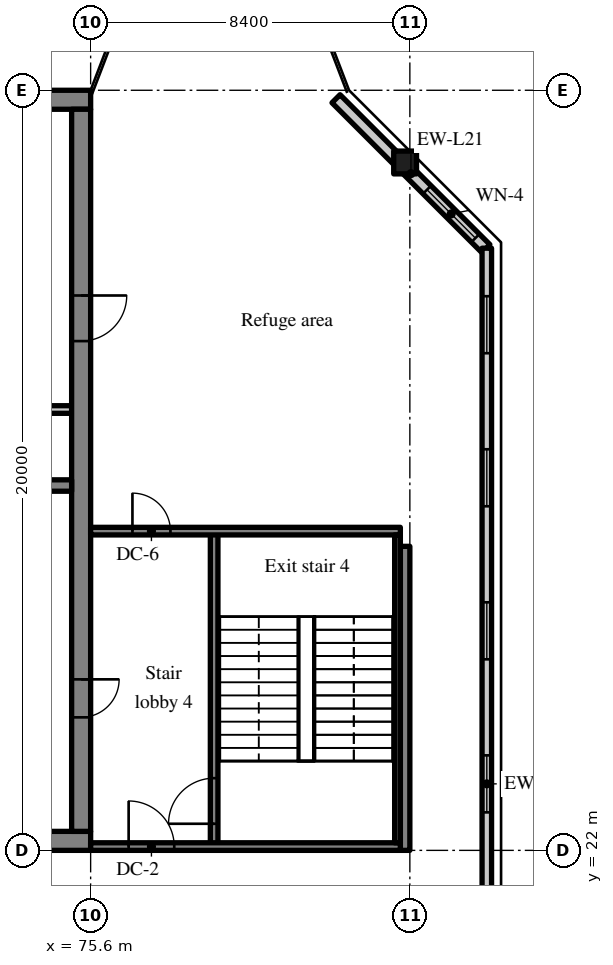
"""IFC4 building model, lengths in metres.
Left out: names, types, materials, properties, quantities, classifications, styles, units other than length and angle.
Written with IfcOpenShell. Run it as: python <this file> out.ifc"""

import sys

from ifc_helpers import new_model, si_unit, direction, frame, frame_2d, origin, origin_2d, place, context, subcontext, project, spatial, rectangle, extrude, source, transform, mapped, element, fill, save


model = new_model("IFC4")
c1 = context("Model", 3, precision=1e-05, world=origin(), true_north=direction((0.0, 1.0)))
c2 = subcontext(c1, "Body", "Model", "MODEL_VIEW")
j1 = project(units=[si_unit("LENGTHUNIT", "METRE"), si_unit("PLANEANGLEUNIT", "RADIAN")], contexts=[c1])
p1 = place(None, origin())
s1 = spatial("IfcSite", under=j1, at=p1, CompositionType="ELEMENT")
p2 = place(p1, origin())
s2 = spatial("IfcBuilding", under=s1, at=p2, CompositionType="ELEMENT")
p3 = place(p2, frame((0.0, 0.0, 305.7)))
s3 = spatial("IfcBuildingStorey", under=s2, at=p3, CompositionType="ELEMENT", Elevation=305.7)
m1 = source(origin(), c2, "Body", "SweptSolid", [
    extrude(rectangle(XDim=50.4, YDim=0.5, at=frame_2d((25.2, 0.0))), origin(), (0.0, 0.0, 1.0), 3.72),
])
p4 = place(p3, frame((25.2, 22.25, 0.0), z_axis=(0.0, 0.0, 1.0), x_axis=(1.0, 0.0, 0.0)))
e1 = element("IfcWall", 1, at=p4, inside=s3, PredefinedType="SHEAR", context=c2, shape_type="MappedRepresentation", body=[
    mapped(m1, transform((0.0, 0.0, 0.0), scale=1.0)),
])
m2 = source(origin(), c2, "Body", "SweptSolid", [
    extrude(rectangle(XDim=1.8, YDim=2.1, at=frame_2d((0.9, 1.05))), frame((0.0, 0.26, 0.0), z_axis=(0.0, -1.0, 0.0), x_axis=(1.0, 0.0, 0.0)), (0.0, 0.0, 1.0), 0.52),
])
p5 = place(p4, frame((15.9, 0.0, 0.0)))
e2 = element("IfcOpeningElement", 2, at=p5, cuts=e1, PredefinedType="OPENING", context=c2, shape_type="MappedRepresentation", body=[
    mapped(m2, transform((0.0, 0.0, 0.0), scale=1.0)),
])
m3 = source(origin(), c2, "Body", "SweptSolid", [
    extrude(rectangle(XDim=0.9, YDim=2.1, at=frame_2d((0.45, 1.05))), frame((0.0, 0.26, 0.0), z_axis=(0.0, -1.0, 0.0), x_axis=(1.0, 0.0, 0.0)), (0.0, 0.0, 1.0), 0.52),
])
p6 = place(p4, frame((11.175, 0.0, 0.0)))
e3 = element("IfcOpeningElement", 3, at=p6, cuts=e1, PredefinedType="OPENING", context=c2, shape_type="MappedRepresentation", body=[
    mapped(m3, transform((0.0, 0.0, 0.0), scale=1.0)),
])
p7 = place(p4, frame((21.525, 0.0, 0.0)))
e4 = element("IfcOpeningElement", 4, at=p7, cuts=e1, PredefinedType="OPENING", context=c2, shape_type="MappedRepresentation", body=[
    mapped(m3, transform((0.0, 0.0, 0.0), scale=1.0)),
])
p8 = place(p4, frame((32.7, 0.0, 0.0)))
e5 = element("IfcOpeningElement", 5, at=p8, cuts=e1, PredefinedType="OPENING", context=c2, shape_type="MappedRepresentation", body=[
    mapped(m2, transform((0.0, 0.0, 0.0), scale=1.0)),
])
m4 = source(origin(), c2, "Body", "SweptSolid", [
    extrude(rectangle(XDim=1.2, YDim=2.1, at=frame_2d((0.6, 1.05))), frame((0.0, 0.26, 0.0), z_axis=(0.0, -1.0, 0.0), x_axis=(1.0, 0.0, 0.0)), (0.0, 0.0, 1.0), 0.52),
])
p9 = place(p4, frame((6.5, 0.0, 0.0)))
e6 = element("IfcOpeningElement", 6, at=p9, cuts=e1, PredefinedType="OPENING", context=c2, shape_type="MappedRepresentation", body=[
    mapped(m4, transform((0.0, 0.0, 0.0), scale=1.0)),
])
p10 = place(p4, frame((47.975, 0.0, 0.0)))
e7 = element("IfcOpeningElement", 7, at=p10, cuts=e1, PredefinedType="OPENING", context=c2, shape_type="MappedRepresentation", body=[
    mapped(m4, transform((0.0, 0.0, 0.0), scale=1.0)),
])
p11 = place(p3, frame((25.2, 41.75, 0.0), z_axis=(0.0, 0.0, 1.0), x_axis=(1.0, 0.0, 0.0)))
e8 = element("IfcWall", 8, at=p11, inside=s3, PredefinedType="SHEAR", context=c2, shape_type="MappedRepresentation", body=[
    mapped(m1, transform((0.0, 0.0, 0.0), scale=1.0)),
])
m5 = source(origin(), c2, "Body", "SweptSolid", [
    extrude(rectangle(XDim=19.0, YDim=0.5, at=frame_2d((9.5, 0.0))), origin(), (0.0, 0.0, 1.0), 3.72),
])
p12 = place(p3, frame((75.35, 22.5, 0.0), z_axis=(0.0, 0.0, 1.0), x_axis=(0.0, 1.0, 0.0)))
e9 = element("IfcWall", 9, at=p12, inside=s3, PredefinedType="SHEAR", context=c2, shape_type="MappedRepresentation", body=[
    mapped(m5, transform((0.0, 0.0, 0.0), scale=1.0)),
])
m6 = source(origin(), c2, "Body", "SweptSolid", [
    extrude(rectangle(XDim=1.0, YDim=2.1, at=frame_2d((0.5, 1.05))), frame((0.0, 0.26, 0.0), z_axis=(0.0, -1.0, 0.0), x_axis=(1.0, 0.0, 0.0)), (0.0, 0.0, 1.0), 0.52),
])
p13 = place(p12, frame((3.0, 0.0, 0.0)))
e10 = element("IfcOpeningElement", 10, at=p13, cuts=e9, PredefinedType="OPENING", context=c2, shape_type="MappedRepresentation", body=[
    mapped(m6, transform((0.0, 0.0, 0.0), scale=1.0)),
])
p14 = place(p12, frame((12.9, 0.0, 0.0)))
e11 = element("IfcOpeningElement", 11, at=p14, cuts=e9, PredefinedType="OPENING", context=c2, shape_type="MappedRepresentation", body=[
    mapped(m4, transform((0.0, 0.0, 0.0), scale=1.0)),
])
m7 = source(origin(), c2, "Body", "SweptSolid", [
    extrude(rectangle(XDim=7.75, YDim=0.3, at=frame_2d((3.875, 0.0))), origin(), (0.0, 0.0, 1.0), 3.72),
])
p15 = place(p3, frame((67.35, 31.6, 0.0), z_axis=(0.0, 0.0, 1.0), x_axis=(1.0, 0.0, 0.0)))
e12 = element("IfcWall", 12, at=p15, inside=s3, PredefinedType="SHEAR", context=c2, shape_type="MappedRepresentation", body=[
    mapped(m7, transform((0.0, 0.0, 0.0), scale=1.0)),
])
m8 = source(origin(), c2, "Body", "SweptSolid", [
    extrude(rectangle(XDim=1.1, YDim=2.1, at=frame_2d((0.55, 1.05))), frame((0.0, 0.16, 0.0), z_axis=(0.0, -1.0, 0.0), x_axis=(1.0, 0.0, 0.0)), (0.0, 0.0, 1.0), 0.32),
])
p16 = place(p15, frame((5.875, 0.0, 0.0)))
e13 = element("IfcOpeningElement", 13, at=p16, cuts=e12, PredefinedType="OPENING", context=c2, shape_type="MappedRepresentation", body=[
    mapped(m8, transform((0.0, 0.0, 0.0), scale=1.0)),
])
m9 = source(origin(), c2, "Body", "SweptSolid", [
    extrude(rectangle(XDim=8.0, YDim=0.25, at=frame_2d((4.0, 0.0))), origin(), (0.0, 0.0, 1.0), 3.72),
])
p17 = place(p3, frame((83.875, 22.0, 0.0), z_axis=(0.0, 0.0, 1.0), x_axis=(0.0, 1.0, 0.0)))
e14 = element("IfcWall", 14, at=p17, inside=s3, PredefinedType="SHEAR", context=c2, shape_type="MappedRepresentation", body=[
    mapped(m9, transform((0.0, 0.0, 0.0), scale=1.0)),
])
m10 = source(origin(), c2, "Body", "SweptSolid", [
    extrude(rectangle(XDim=0.6, YDim=0.6, at=origin_2d()), origin(), (0.0, 0.0, 1.0), 3.72),
])
p18 = place(p3, frame((83.875, 40.1, 0.0), z_axis=(0.0, 0.0, 1.0), x_axis=(1.0, 0.0, 0.0)))
e15 = element("IfcColumn", 15, at=p18, inside=s3, PredefinedType="COLUMN", context=c2, shape_type="MappedRepresentation", body=[
    mapped(m10, transform((0.0, 0.0, 0.0), scale=1.0)),
])
m11 = source(origin(), c2, "Body", "SweptSolid", [
    extrude(rectangle(XDim=5.576, YDim=0.3, at=frame_2d((2.788, 0.0))), origin(), (0.0, 0.0, 1.0), 3.72),
])
p19 = place(p3, frame((86.0, 37.834, 0.0), z_axis=(0.0, 0.0, 1.0), x_axis=(-0.707106781187, 0.707106781187, 0.0)))
e16 = element("IfcWall", 16, at=p19, inside=s3, PredefinedType="SOLIDWALL", context=c2, shape_type="MappedRepresentation", body=[
    mapped(m11, transform((0.0, 0.0, 0.0), scale=1.0)),
])
m12 = source(origin(), c2, "Body", "SweptSolid", [
    extrude(rectangle(XDim=1.8, YDim=1.5, at=frame_2d((0.9, 0.75))), frame((0.0, 0.16, 0.0), z_axis=(0.0, -1.0, 0.0), x_axis=(1.0, 0.0, 0.0)), (0.0, 0.0, 1.0), 0.32),
])
p20 = place(p19, frame((0.39, 0.0, 0.9)))
e17 = element("IfcOpeningElement", 17, at=p20, cuts=e16, PredefinedType="OPENING", context=c2, shape_type="MappedRepresentation", body=[
    mapped(m12, transform((0.0, 0.0, 0.0), scale=1.0)),
])
m13 = source(origin(), c2, "Body", "SweptSolid", [
    extrude(rectangle(XDim=28.189, YDim=0.25, at=frame_2d((14.095, 0.0))), origin(), (0.0, 0.0, 1.0), 3.72),
])
p21 = place(p3, frame((86.025, 9.655, 0.0), z_axis=(0.0, 0.0, 1.0), x_axis=(0.0, 1.0, 0.0)))
e18 = element("IfcWall", 18, at=p21, inside=s3, PredefinedType="SOLIDWALL", context=c2, shape_type="MappedRepresentation", body=[
    mapped(m13, transform((0.0, 0.0, 0.0), scale=1.0)),
])
m14 = source(origin(), c2, "Body", "SweptSolid", [
    extrude(rectangle(XDim=1.5, YDim=1.5, at=frame_2d((0.75, 0.75))), frame((0.0, 0.135, 0.0), z_axis=(0.0, -1.0, 0.0), x_axis=(1.0, 0.0, 0.0)), (0.0, 0.0, 1.0), 0.27),
])
p22 = place(p21, frame((1.263, 0.0, 0.9)))
e19 = element("IfcOpeningElement", 19, at=p22, cuts=e18, PredefinedType="OPENING", context=c2, shape_type="MappedRepresentation", body=[
    mapped(m14, transform((0.0, 0.0, 0.0), scale=1.0)),
])
p23 = place(p21, frame((5.291, 0.0, 0.9)))
e20 = element("IfcOpeningElement", 20, at=p23, cuts=e18, PredefinedType="OPENING", context=c2, shape_type="MappedRepresentation", body=[
    mapped(m14, transform((0.0, 0.0, 0.0), scale=1.0)),
])
p24 = place(p21, frame((9.318, 0.0, 0.9)))
e21 = element("IfcOpeningElement", 21, at=p24, cuts=e18, PredefinedType="OPENING", context=c2, shape_type="MappedRepresentation", body=[
    mapped(m14, transform((0.0, 0.0, 0.0), scale=1.0)),
])
p25 = place(p21, frame((13.345, 0.0, 0.9)))
e22 = element("IfcOpeningElement", 22, at=p25, cuts=e18, PredefinedType="OPENING", context=c2, shape_type="MappedRepresentation", body=[
    mapped(m14, transform((0.0, 0.0, 0.0), scale=1.0)),
])
p26 = place(p21, frame((17.372, 0.0, 0.9)))
e23 = element("IfcOpeningElement", 23, at=p26, cuts=e18, PredefinedType="OPENING", context=c2, shape_type="MappedRepresentation", body=[
    mapped(m14, transform((0.0, 0.0, 0.0), scale=1.0)),
])
p27 = place(p21, frame((21.399, 0.0, 0.9)))
e24 = element("IfcOpeningElement", 24, at=p27, cuts=e18, PredefinedType="OPENING", context=c2, shape_type="MappedRepresentation", body=[
    mapped(m14, transform((0.0, 0.0, 0.0), scale=1.0)),
])
p28 = place(p21, frame((25.426, 0.0, 0.9)))
e25 = element("IfcOpeningElement", 25, at=p28, cuts=e18, PredefinedType="OPENING", context=c2, shape_type="MappedRepresentation", body=[
    mapped(m14, transform((0.0, 0.0, 0.0), scale=1.0)),
])
m15 = source(origin(), c2, "Body", "SweptSolid", [
    extrude(rectangle(XDim=2.65, YDim=0.2, at=frame_2d((1.325, 0.0))), origin(), (0.0, 0.0, 1.0), 3.72),
])
p29 = place(p3, frame((72.45, 33.6, 0.0), z_axis=(0.0, 0.0, 1.0), x_axis=(1.0, 0.0, 0.0)))
e26 = element("IfcWall", 26, at=p29, inside=s3, PredefinedType="SOLIDWALL", context=c2, shape_type="MappedRepresentation", body=[
    mapped(m15, transform((0.0, 0.0, 0.0), scale=1.0)),
])
m16 = source(origin(), c2, "Body", "SweptSolid", [
    extrude(rectangle(XDim=8.3, YDim=0.2, at=frame_2d((4.15, 0.0))), origin(), (0.0, 0.0, 1.0), 3.72),
])
p30 = place(p3, frame((78.85, 22.1, 0.0), z_axis=(0.0, 0.0, 1.0), x_axis=(0.0, 1.0, 0.0)))
e27 = element("IfcWall", 27, at=p30, inside=s3, PredefinedType="SOLIDWALL", context=c2, shape_type="MappedRepresentation", body=[
    mapped(m16, transform((0.0, 0.0, 0.0), scale=1.0)),
])
m17 = source(origin(), c2, "Body", "SweptSolid", [
    extrude(rectangle(XDim=1.2, YDim=2.1, at=frame_2d((0.6, 1.05))), frame((0.0, 0.11, 0.0), z_axis=(0.0, -1.0, 0.0), x_axis=(1.0, 0.0, 0.0)), (0.0, 0.0, 1.0), 0.22),
])
p31 = place(p30, frame((0.6, 0.0, 0.0)))
e28 = element("IfcOpeningElement", 28, at=p31, cuts=e27, PredefinedType="OPENING", context=c2, shape_type="MappedRepresentation", body=[
    mapped(m17, transform((0.0, 0.0, 0.0), scale=1.0)),
])
m18 = source(origin(), c2, "Body", "SweptSolid", [
    extrude(rectangle(XDim=8.15, YDim=0.2, at=frame_2d((4.075, 0.0))), origin(), (0.0, 0.0, 1.0), 3.72),
])
p32 = place(p3, frame((83.75, 22.1, 0.0), z_axis=(0.0, 0.0, 1.0), x_axis=(-1.0, 0.0, 0.0)))
e29 = element("IfcWall", 29, at=p32, inside=s3, PredefinedType="SOLIDWALL", context=c2, shape_type="MappedRepresentation", body=[
    mapped(m18, transform((0.0, 0.0, 0.0), scale=1.0)),
])
p33 = place(p32, frame((5.95, 0.0, 0.0)))
e30 = element("IfcOpeningElement", 30, at=p33, cuts=e29, PredefinedType="OPENING", context=c2, shape_type="MappedRepresentation", body=[
    mapped(m17, transform((0.0, 0.0, 0.0), scale=1.0)),
])
p34 = place(p3, frame((83.75, 30.4, 0.0), z_axis=(0.0, 0.0, 1.0), x_axis=(-1.0, 0.0, 0.0)))
e31 = element("IfcWall", 31, at=p34, inside=s3, PredefinedType="SOLIDWALL", context=c2, shape_type="MappedRepresentation", body=[
    mapped(m18, transform((0.0, 0.0, 0.0), scale=1.0)),
])
m19 = source(origin(), c2, "Body", "SweptSolid", [
    extrude(rectangle(XDim=1.0, YDim=2.1, at=frame_2d((0.5, 1.05))), frame((0.0, 0.11, 0.0), z_axis=(0.0, -1.0, 0.0), x_axis=(1.0, 0.0, 0.0)), (0.0, 0.0, 1.0), 0.22),
])
p35 = place(p34, frame((6.05, 0.0, 0.0)))
e32 = element("IfcOpeningElement", 32, at=p35, cuts=e31, PredefinedType="OPENING", context=c2, shape_type="MappedRepresentation", body=[
    mapped(m19, transform((0.0, 0.0, 0.0), scale=1.0)),
])
m20 = source(origin(), c2, "Body", "SweptSolid", [
    extrude(rectangle(XDim=8.1, YDim=0.15, at=frame_2d((4.05, 0.0))), origin(), (0.0, 0.0, 1.0), 3.72),
])
p36 = place(p3, frame((83.675, 22.2, 0.0), z_axis=(0.0, 0.0, 1.0), x_axis=(0.0, 1.0, 0.0)))
e33 = element("IfcWall", 33, at=p36, inside=s3, PredefinedType="SOLIDWALL", context=c2, shape_type="MappedRepresentation", body=[
    mapped(m20, transform((0.0, 0.0, 0.0), scale=1.0)),
])
m21 = source(origin(), c2, "Body", "SweptSolid", [
    extrude(rectangle(XDim=1.8, YDim=1.5, at=frame_2d((0.9, 0.75))), frame((0.0, 0.03, 0.0), z_axis=(0.0, -1.0, 0.0), x_axis=(1.0, 0.0, 0.0)), (0.0, 0.0, 1.0), 0.06),
])
p37 = place(p20, origin())
e34 = element("IfcWindow", 34, at=p37, inside=s3, PartitioningType="SINGLE_PANEL", PredefinedType="WINDOW", context=c2, shape_type="MappedRepresentation", body=[
    mapped(m21, transform((0.0, 0.0, 0.0), scale=1.0)),
])
fill(e17, e34)
m22 = source(origin(), c2, "Body", "SweptSolid", [
    extrude(rectangle(XDim=1.5, YDim=1.5, at=frame_2d((0.75, 0.75))), frame((0.0, 0.03, 0.0), z_axis=(0.0, -1.0, 0.0), x_axis=(1.0, 0.0, 0.0)), (0.0, 0.0, 1.0), 0.06),
])
p38 = place(p25, origin())
e35 = element("IfcWindow", 35, at=p38, inside=s3, PartitioningType="SINGLE_PANEL", PredefinedType="WINDOW", context=c2, shape_type="MappedRepresentation", body=[
    mapped(m22, transform((0.0, 0.0, 0.0), scale=1.0)),
])
fill(e22, e35)
p39 = place(p26, origin())
e36 = element("IfcWindow", 36, at=p39, inside=s3, PartitioningType="SINGLE_PANEL", PredefinedType="WINDOW", context=c2, shape_type="MappedRepresentation", body=[
    mapped(m22, transform((0.0, 0.0, 0.0), scale=1.0)),
])
fill(e23, e36)
p40 = place(p27, origin())
e37 = element("IfcWindow", 37, at=p40, inside=s3, PartitioningType="SINGLE_PANEL", PredefinedType="WINDOW", context=c2, shape_type="MappedRepresentation", body=[
    mapped(m22, transform((0.0, 0.0, 0.0), scale=1.0)),
])
fill(e24, e37)
p41 = place(p28, origin())
e38 = element("IfcWindow", 38, at=p41, inside=s3, PartitioningType="SINGLE_PANEL", PredefinedType="WINDOW", context=c2, shape_type="MappedRepresentation", body=[
    mapped(m22, transform((0.0, 0.0, 0.0), scale=1.0)),
])
fill(e25, e38)
m23 = source(origin(), c2, "Body", "SweptSolid", [
    extrude(rectangle(XDim=1.0, YDim=2.1, at=frame_2d((0.5, 1.05))), frame((0.0, 0.025, 0.0), z_axis=(0.0, -1.0, 0.0), x_axis=(1.0, 0.0, 0.0)), (0.0, 0.0, 1.0), 0.05),
])
p42 = place(p13, origin())
e39 = element("IfcDoor", 39, at=p42, inside=s3, OperationType="SINGLE_SWING_RIGHT", PredefinedType="DOOR", context=c2, shape_type="MappedRepresentation", body=[
    mapped(m23, transform((0.0, 0.0, 0.0), scale=1.0)),
])
fill(e10, e39)
m24 = source(origin(), c2, "Body", "SweptSolid", [
    extrude(rectangle(XDim=1.2, YDim=2.1, at=frame_2d((0.6, 1.05))), frame((0.0, 0.025, 0.0), z_axis=(0.0, -1.0, 0.0), x_axis=(1.0, 0.0, 0.0)), (0.0, 0.0, 1.0), 0.05),
])
p43 = place(p14, origin())
e40 = element("IfcDoor", 40, at=p43, inside=s3, OperationType="SINGLE_SWING_RIGHT", PredefinedType="DOOR", context=c2, shape_type="MappedRepresentation", body=[
    mapped(m24, transform((0.0, 0.0, 0.0), scale=1.0)),
])
fill(e11, e40)
p44 = place(p31, origin())
e41 = element("IfcDoor", 41, at=p44, inside=s3, OperationType="SINGLE_SWING_LEFT", PredefinedType="DOOR", context=c2, shape_type="MappedRepresentation", body=[
    mapped(m24, transform((0.0, 0.0, 0.0), scale=1.0)),
])
fill(e28, e41)
p45 = place(p33, origin())
e42 = element("IfcDoor", 42, at=p45, inside=s3, OperationType="SINGLE_SWING_RIGHT", PredefinedType="DOOR", context=c2, shape_type="MappedRepresentation", body=[
    mapped(m24, transform((0.0, 0.0, 0.0), scale=1.0)),
])
fill(e30, e42)
p46 = place(p35, origin())
e43 = element("IfcDoor", 43, at=p46, inside=s3, OperationType="SINGLE_SWING_RIGHT", PredefinedType="DOOR", context=c2, shape_type="MappedRepresentation", body=[
    mapped(m23, transform((0.0, 0.0, 0.0), scale=1.0)),
])
fill(e32, e43)
save(model, sys.argv[1])
